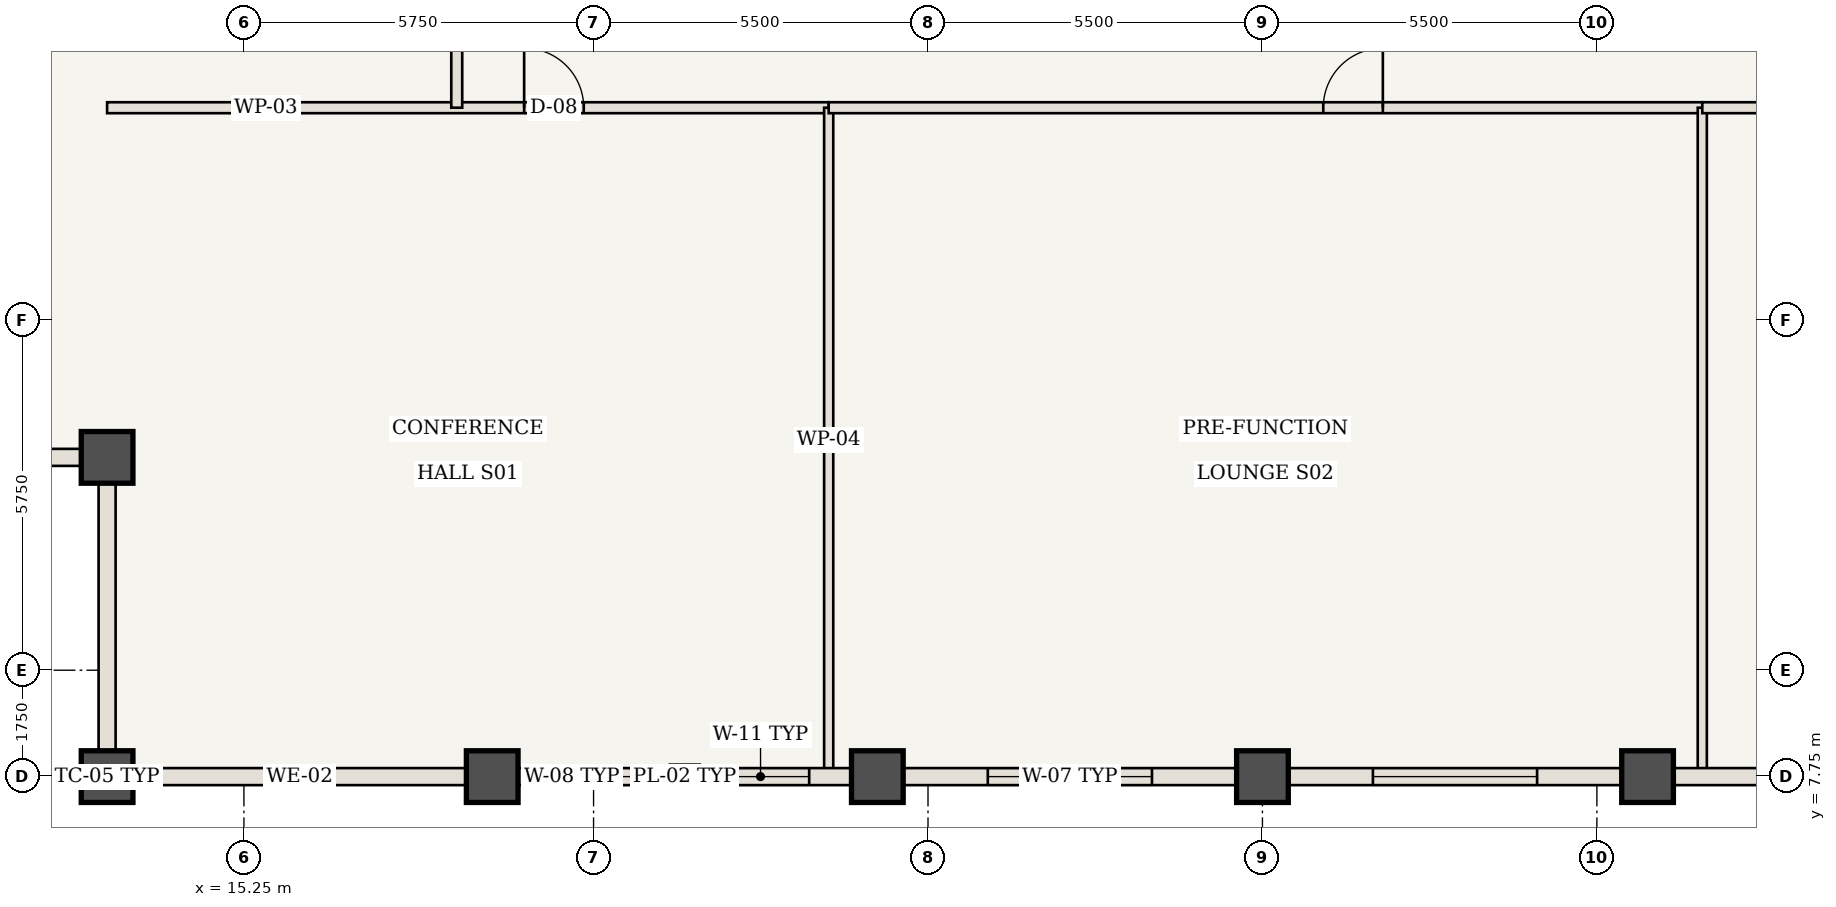
"""IFC4 building model, lengths in metres.
Left out: names, types, materials, properties, quantities, classifications, styles, units other than length and angle.
Written with IfcOpenShell. Run it as: python <this file> out.ifc"""

import sys

from ifc_helpers import new_model, si_unit, direction, frame, frame_2d, origin, origin_2d, place, context, subcontext, project, spatial, rectangle, extrude, element, fill, save


model = new_model("IFC4")
c1 = context("Model", 3, precision=1e-05, world=origin(), true_north=direction((0.0, 1.0)))
c2 = subcontext(c1, "Body", "Model", "MODEL_VIEW")
j1 = project(units=[si_unit("LENGTHUNIT", "METRE"), si_unit("PLANEANGLEUNIT", "RADIAN")], contexts=[c1])
p1 = place(None, origin())
s1 = spatial("IfcSite", under=j1, at=p1, CompositionType="ELEMENT")
p2 = place(p1, origin())
s2 = spatial("IfcBuilding", under=s1, at=p2, CompositionType="ELEMENT")
p3 = place(p2, frame((0.0, 0.0, 240.8)))
s3 = spatial("IfcBuildingStorey", under=s2, at=p3, CompositionType="ELEMENT", Elevation=240.8)
for number, where, z_axis, x_axis in (
    (1, (13.0, 7.75, 0.0), (0.0, 0.0, 1.0), (1.0, 0.0, 0.0)),
    (2, (13.0, 13.0, 0.0), (0.0, 0.0, 1.0), (1.0, 0.0, 0.0)),
    (3, (19.333, 7.75, 0.0), (0.0, 0.0, 1.0), (1.0, 0.0, 0.0)),
    (4, (25.667, 7.75, 0.0), (0.0, 0.0, 1.0), (1.0, 0.0, 0.0)),
    (5, (32.0, 7.75, 0.0), (0.0, 0.0, 1.0), (1.0, 0.0, 0.0)),
    (6, (38.333, 7.75, 0.0), (0.0, 0.0, 1.0), (1.0, 0.0, 0.0)),
):
    element("IfcColumn", number, at=place(p3, frame(where, z_axis=z_axis, x_axis=x_axis)), inside=s3, PredefinedType="COLUMN", context=c2, shape_type="SweptSolid", body=[
        extrude(rectangle(XDim=0.85, YDim=0.85, at=origin_2d()), origin(), (0.0, 0.0, 1.0), 3.85),
    ])
p4 = place(p3, frame((13.0, 18.75, 0.0), z_axis=(0.0, 0.0, 1.0), x_axis=(1.0, 0.0, 0.0)))
e7 = element("IfcWall", 7, at=p4, inside=s3, PredefinedType="STANDARD", context=c2, shape_type="SweptSolid", body=[
    extrude(rectangle(XDim=11.867, YDim=0.18, at=frame_2d((5.933, 0.0))), origin(), (0.0, 0.0, 1.0), 3.685),
])
p5 = place(p4, frame((6.858, 0.0, 0.0)))
e8 = element("IfcOpeningElement", 8, at=p5, cuts=e7, PredefinedType="OPENING", context=c2, shape_type="SweptSolid", body=[
    extrude(rectangle(XDim=0.98, YDim=2.2, at=frame_2d((0.49, 1.1))), frame((0.0, 0.1, 0.0), z_axis=(0.0, -1.0, 0.0), x_axis=(1.0, 0.0, 0.0)), (0.0, 0.0, 1.0), 0.2),
])
p6 = place(p3, frame((24.867, 7.81, 0.0), z_axis=(0.0, 0.0, 1.0), x_axis=(0.0, 1.0, 0.0)))
e9 = element("IfcWall", 9, at=p6, inside=s3, PredefinedType="STANDARD", context=c2, shape_type="SweptSolid", body=[
    extrude(rectangle(XDim=10.94, YDim=0.15, at=frame_2d((5.47, 0.0))), origin(), (0.0, 0.0, 1.0), 3.685),
])
p7 = place(p3, frame((24.867, 18.75, 0.0), z_axis=(0.0, 0.0, 1.0), x_axis=(1.0, 0.0, 0.0)))
e10 = element("IfcWall", 10, at=p7, inside=s3, PredefinedType="STANDARD", context=c2, shape_type="SweptSolid", body=[
    extrude(rectangle(XDim=14.367, YDim=0.18, at=frame_2d((7.183, 0.0))), origin(), (0.0, 0.0, 1.0), 3.685),
])
p8 = place(p7, frame((8.133, 0.0, 0.0)))
e11 = element("IfcOpeningElement", 11, at=p8, cuts=e10, PredefinedType="OPENING", context=c2, shape_type="SweptSolid", body=[
    extrude(rectangle(XDim=0.98, YDim=2.2, at=frame_2d((0.49, 1.1))), frame((0.0, 0.1, 0.0), z_axis=(0.0, -1.0, 0.0), x_axis=(1.0, 0.0, 0.0)), (0.0, 0.0, 1.0), 0.2),
])
p9 = place(p3, frame((39.233, 7.81, 0.0), z_axis=(0.0, 0.0, 1.0), x_axis=(0.0, 1.0, 0.0)))
e12 = element("IfcWall", 12, at=p9, inside=s3, PredefinedType="STANDARD", context=c2, shape_type="SweptSolid", body=[
    extrude(rectangle(XDim=10.94, YDim=0.15, at=frame_2d((5.47, 0.0))), origin(), (0.0, 0.0, 1.0), 3.685),
])
p10 = place(p3, frame((39.233, 18.75, 0.0), z_axis=(0.0, 0.0, 1.0), x_axis=(1.0, 0.0, 0.0)))
e13 = element("IfcWall", 13, at=p10, inside=s3, PredefinedType="STANDARD", context=c2, shape_type="SweptSolid", body=[
    extrude(rectangle(XDim=11.767, YDim=0.18, at=frame_2d((5.883, 0.0))), origin(), (0.0, 0.0, 1.0), 3.685),
])
p11 = place(p10, frame((1.208, 0.0, 0.0)))
e14 = element("IfcOpeningElement", 14, at=p11, cuts=e13, PredefinedType="OPENING", context=c2, shape_type="SweptSolid", body=[
    extrude(rectangle(XDim=0.98, YDim=2.2, at=frame_2d((0.49, 1.1))), frame((0.0, 0.1, 0.0), z_axis=(0.0, -1.0, 0.0), x_axis=(1.0, 0.0, 0.0)), (0.0, 0.0, 1.0), 0.2),
])
p12 = place(p3, frame((18.75, 18.75, 0.0), z_axis=(0.0, 0.0, 1.0), x_axis=(0.0, 1.0, 0.0)))
e15 = element("IfcWall", 15, at=p12, inside=s3, PredefinedType="STANDARD", context=c2, shape_type="SweptSolid", body=[
    extrude(rectangle(XDim=26.5, YDim=0.18, at=frame_2d((13.25, 0.0))), origin(), (0.0, 0.0, 1.0), 3.685),
])
p13 = place(p12, frame((14.2, 0.0, 0.0)))
e16 = element("IfcOpeningElement", 16, at=p13, cuts=e15, PredefinedType="OPENING", context=c2, shape_type="SweptSolid", body=[
    extrude(rectangle(XDim=0.98, YDim=2.2, at=frame_2d((0.49, 1.1))), frame((0.0, 0.1, 0.0), z_axis=(0.0, -1.0, 0.0), x_axis=(1.0, 0.0, 0.0)), (0.0, 0.0, 1.0), 0.2),
])
p14 = place(p3, frame((19.333, 7.75, 0.0), z_axis=(0.0, 0.0, 1.0), x_axis=(-1.0, 0.0, 0.0)))
e17 = element("IfcWall", 17, at=p14, inside=s3, PredefinedType="USERDEFINED", context=c2, shape_type="SweptSolid", body=[
    extrude(rectangle(XDim=6.333, YDim=0.28, at=frame_2d((3.167, 0.0))), origin(), (0.0, 0.0, 1.0), 2.985),
])
p15 = place(p3, frame((25.667, 7.75, 0.0), z_axis=(0.0, 0.0, 1.0), x_axis=(-1.0, 0.0, 0.0)))
e18 = element("IfcWall", 18, at=p15, inside=s3, PredefinedType="USERDEFINED", context=c2, shape_type="SweptSolid", body=[
    extrude(rectangle(XDim=6.333, YDim=0.28, at=frame_2d((3.167, 0.0))), origin(), (0.0, 0.0, 1.0), 2.985),
])
p16 = place(p15, frame((1.121, 0.0, 0.85)))
e19 = element("IfcOpeningElement", 19, at=p16, cuts=e18, PredefinedType="OPENING", context=c2, shape_type="SweptSolid", body=[
    extrude(rectangle(XDim=1.6, YDim=1.935, at=frame_2d((0.8, 0.968))), frame((0.0, 0.15, 0.0), z_axis=(0.0, -1.0, 0.0), x_axis=(1.0, 0.0, 0.0)), (0.0, 0.0, 1.0), 0.3),
])
p17 = place(p15, frame((3.675, 0.0, 0.85)))
e20 = element("IfcOpeningElement", 20, at=p17, cuts=e18, PredefinedType="OPENING", context=c2, shape_type="SweptSolid", body=[
    extrude(rectangle(XDim=1.95, YDim=1.935, at=frame_2d((0.975, 0.968))), frame((0.0, 0.15, 0.0), z_axis=(0.0, -1.0, 0.0), x_axis=(1.0, 0.0, 0.0)), (0.0, 0.0, 1.0), 0.3),
])
p18 = place(p3, frame((32.0, 7.75, 0.0), z_axis=(0.0, 0.0, 1.0), x_axis=(-1.0, 0.0, 0.0)))
e21 = element("IfcWall", 21, at=p18, inside=s3, PredefinedType="USERDEFINED", context=c2, shape_type="SweptSolid", body=[
    extrude(rectangle(XDim=6.333, YDim=0.28, at=frame_2d((3.167, 0.0))), origin(), (0.0, 0.0, 1.0), 2.985),
])
p19 = place(p18, frame((1.817, 0.0, 0.85)))
e22 = element("IfcOpeningElement", 22, at=p19, cuts=e21, PredefinedType="OPENING", context=c2, shape_type="SweptSolid", body=[
    extrude(rectangle(XDim=2.7, YDim=1.935, at=frame_2d((1.35, 0.968))), frame((0.0, 0.15, 0.0), z_axis=(0.0, -1.0, 0.0), x_axis=(1.0, 0.0, 0.0)), (0.0, 0.0, 1.0), 0.3),
])
p20 = place(p3, frame((38.333, 7.75, 0.0), z_axis=(0.0, 0.0, 1.0), x_axis=(-1.0, 0.0, 0.0)))
e23 = element("IfcWall", 23, at=p20, inside=s3, PredefinedType="USERDEFINED", context=c2, shape_type="SweptSolid", body=[
    extrude(rectangle(XDim=6.333, YDim=0.28, at=frame_2d((3.167, 0.0))), origin(), (0.0, 0.0, 1.0), 2.985),
])
p21 = place(p20, frame((1.817, 0.0, 0.85)))
e24 = element("IfcOpeningElement", 24, at=p21, cuts=e23, PredefinedType="OPENING", context=c2, shape_type="SweptSolid", body=[
    extrude(rectangle(XDim=2.7, YDim=1.935, at=frame_2d((1.35, 0.968))), frame((0.0, 0.15, 0.0), z_axis=(0.0, -1.0, 0.0), x_axis=(1.0, 0.0, 0.0)), (0.0, 0.0, 1.0), 0.3),
])
p22 = place(p3, frame((44.667, 7.75, 0.0), z_axis=(0.0, 0.0, 1.0), x_axis=(-1.0, 0.0, 0.0)))
e25 = element("IfcWall", 25, at=p22, inside=s3, PredefinedType="USERDEFINED", context=c2, shape_type="SweptSolid", body=[
    extrude(rectangle(XDim=6.333, YDim=0.28, at=frame_2d((3.167, 0.0))), origin(), (0.0, 0.0, 1.0), 2.985),
])
p23 = place(p22, frame((0.708, 0.0, 0.85)))
e26 = element("IfcOpeningElement", 26, at=p23, cuts=e25, PredefinedType="OPENING", context=c2, shape_type="SweptSolid", body=[
    extrude(rectangle(XDim=1.95, YDim=1.935, at=frame_2d((0.975, 0.968))), frame((0.0, 0.15, 0.0), z_axis=(0.0, -1.0, 0.0), x_axis=(1.0, 0.0, 0.0)), (0.0, 0.0, 1.0), 0.3),
])
for number, where, z_axis, x_axis in (
    (27, (13.0, 7.75, 0.0), (0.0, 0.0, 1.0), (0.0, 1.0, 0.0)),
    (28, (13.0, 13.0, 0.0), (0.0, 0.0, 1.0), (-1.0, 0.0, 0.0)),
):
    element("IfcWall", number, at=place(p3, frame(where, z_axis=z_axis, x_axis=x_axis)), inside=s3, PredefinedType="USERDEFINED", context=c2, shape_type="SweptSolid", body=[
        extrude(rectangle(XDim=5.25, YDim=0.28, at=frame_2d((2.625, 0.0))), origin(), (0.0, 0.0, 1.0), 2.985),
    ])
p24 = place(p5, origin())
e29 = element("IfcDoor", 29, at=p24, inside=s3, OperationType="SINGLE_SWING_LEFT", PredefinedType="DOOR", context=c2, shape_type="SweptSolid", body=[
    extrude(rectangle(XDim=0.98, YDim=2.2, at=frame_2d((0.49, 1.1))), frame((0.0, 0.025, 0.0), z_axis=(0.0, -1.0, 0.0), x_axis=(1.0, 0.0, 0.0)), (0.0, 0.0, 1.0), 0.05),
])
fill(e8, e29)
p25 = place(p8, origin())
e30 = element("IfcDoor", 30, at=p25, inside=s3, OperationType="SINGLE_SWING_RIGHT", PredefinedType="DOOR", context=c2, shape_type="SweptSolid", body=[
    extrude(rectangle(XDim=0.98, YDim=2.2, at=frame_2d((0.49, 1.1))), frame((0.0, 0.025, 0.0), z_axis=(0.0, -1.0, 0.0), x_axis=(1.0, 0.0, 0.0)), (0.0, 0.0, 1.0), 0.05),
])
fill(e11, e30)
p26 = place(p16, origin())
e31 = element("IfcWindow", 31, at=p26, inside=s3, PartitioningType="SINGLE_PANEL", PredefinedType="WINDOW", context=c2, shape_type="SweptSolid", body=[
    extrude(rectangle(XDim=1.6, YDim=1.935, at=frame_2d((0.8, 0.968))), frame((0.0, 0.03, 0.0), z_axis=(0.0, -1.0, 0.0), x_axis=(1.0, 0.0, 0.0)), (0.0, 0.0, 1.0), 0.06),
])
fill(e19, e31)
p27 = place(p17, origin())
e32 = element("IfcWindow", 32, at=p27, inside=s3, PartitioningType="SINGLE_PANEL", PredefinedType="WINDOW", context=c2, shape_type="SweptSolid", body=[
    extrude(rectangle(XDim=1.95, YDim=1.935, at=frame_2d((0.975, 0.968))), frame((0.0, 0.03, 0.0), z_axis=(0.0, -1.0, 0.0), x_axis=(1.0, 0.0, 0.0)), (0.0, 0.0, 1.0), 0.06),
])
fill(e20, e32)
p28 = place(p19, origin())
e33 = element("IfcWindow", 33, at=p28, inside=s3, PartitioningType="SINGLE_PANEL", PredefinedType="WINDOW", context=c2, shape_type="SweptSolid", body=[
    extrude(rectangle(XDim=2.7, YDim=1.935, at=frame_2d((1.35, 0.968))), frame((0.0, 0.03, 0.0), z_axis=(0.0, -1.0, 0.0), x_axis=(1.0, 0.0, 0.0)), (0.0, 0.0, 1.0), 0.06),
])
fill(e22, e33)
p29 = place(p21, origin())
e34 = element("IfcWindow", 34, at=p29, inside=s3, PartitioningType="SINGLE_PANEL", PredefinedType="WINDOW", context=c2, shape_type="SweptSolid", body=[
    extrude(rectangle(XDim=2.7, YDim=1.935, at=frame_2d((1.35, 0.968))), frame((0.0, 0.03, 0.0), z_axis=(0.0, -1.0, 0.0), x_axis=(1.0, 0.0, 0.0)), (0.0, 0.0, 1.0), 0.06),
])
fill(e24, e34)
save(model, sys.argv[1])
